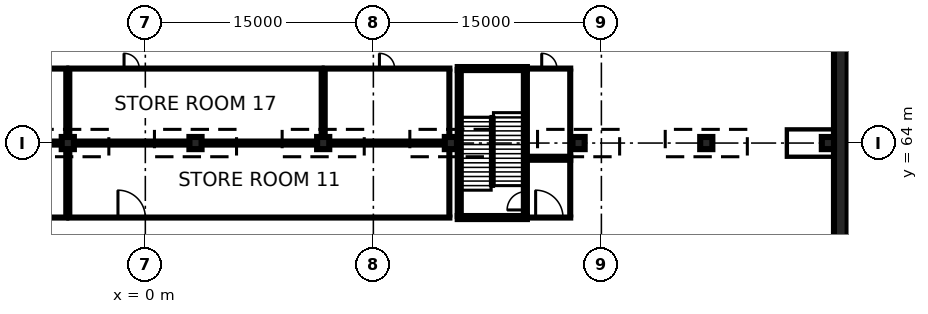
"""IFC4 building model, lengths in metres.
Left out: names, types, materials, properties, quantities, classifications, styles, units other than length and angle.
Written with IfcOpenShell. Run it as: python <this file> out.ifc"""

import sys

from ifc_helpers import new_model, si_unit, direction, frame, frame_2d, origin, origin_2d, place, context, subcontext, project, spatial, rectangle, extrude, element, fill, save


model = new_model("IFC4")
c1 = context("Model", 3, precision=1e-05, world=origin(), true_north=direction((0.0, 1.0)))
c2 = subcontext(c1, "Body", "Model", "MODEL_VIEW")
j1 = project(units=[si_unit("LENGTHUNIT", "METRE"), si_unit("PLANEANGLEUNIT", "RADIAN")], contexts=[c1])
p1 = place(None, origin())
s1 = spatial("IfcSite", under=j1, at=p1, CompositionType="ELEMENT")
p2 = place(p1, origin())
s2 = spatial("IfcBuilding", under=s1, at=p2, CompositionType="ELEMENT")
p3 = place(p2, frame((0.0, 0.0, -12.0)))
s3 = spatial("IfcBuildingStorey", under=s2, at=p3, CompositionType="ELEMENT", Elevation=-12.0)
p4 = place(p3, frame((45.75, -80.0, 0.0), z_axis=(0.0, 0.0, 1.0), x_axis=(0.0, 1.0, 0.0)))
e1 = element("IfcWall", 1, at=p4, inside=s3, PredefinedType="USERDEFINED", context=c2, shape_type="SweptSolid", body=[
    extrude(rectangle(XDim=160.0, YDim=0.9, at=frame_2d((80.0, 0.0))), origin(), (0.0, 0.0, 1.0), 11.55),
])
for number, where, z_axis, x_axis in (
    (2, (-5.1, 64.0, 0.0), (0.0, 0.0, 1.0), (1.0, 0.0, 0.0)),
    (3, (3.3, 64.0, 0.0), (0.0, 0.0, 1.0), (1.0, 0.0, 0.0)),
    (4, (11.7, 64.0, 0.0), (0.0, 0.0, 1.0), (1.0, 0.0, 0.0)),
    (5, (20.1, 64.0, 0.0), (0.0, 0.0, 1.0), (1.0, 0.0, 0.0)),
    (6, (28.5, 64.0, 0.0), (0.0, 0.0, 1.0), (1.0, 0.0, 0.0)),
    (7, (36.9, 64.0, 0.0), (0.0, 0.0, 1.0), (1.0, 0.0, 0.0)),
    (8, (44.9, 64.0, 0.0), (0.0, 0.0, 1.0), (1.0, 0.0, 0.0)),
):
    element("IfcColumn", number, at=place(p3, frame(where, z_axis=z_axis, x_axis=x_axis)), inside=s3, PredefinedType="COLUMN", context=c2, shape_type="SweptSolid", body=[
        extrude(rectangle(XDim=0.8, YDim=0.8, at=origin_2d()), origin(), (0.0, 0.0, 1.0), 4.4),
    ])
p5 = place(p3, frame((-13.5, 59.1, 0.0), z_axis=(0.0, 0.0, 1.0), x_axis=(1.0, 0.0, 0.0)))
e9 = element("IfcWall", 9, at=p5, inside=s3, PredefinedType="PARTITIONING", context=c2, shape_type="SweptSolid", body=[
    extrude(rectangle(XDim=8.4, YDim=0.2, at=frame_2d((4.2, 0.0))), origin(), (0.0, 0.0, 1.0), 4.4),
])
p6 = place(p5, frame((3.7, 0.0, 0.0)))
e10 = element("IfcOpeningElement", 10, at=p6, cuts=e9, PredefinedType="OPENING", context=c2, shape_type="SweptSolid", body=[
    extrude(rectangle(XDim=1.0, YDim=2.1, at=frame_2d((0.5, 1.05))), frame((0.0, 0.11, 0.0), z_axis=(0.0, -1.0, 0.0), x_axis=(1.0, 0.0, 0.0)), (0.0, 0.0, 1.0), 0.22),
])
p7 = place(p3, frame((-13.5, 63.9, 0.0), z_axis=(0.0, 0.0, 1.0), x_axis=(1.0, 0.0, 0.0)))
e11 = element("IfcWall", 11, at=p7, inside=s3, PredefinedType="PARTITIONING", context=c2, shape_type="SweptSolid", body=[
    extrude(rectangle(XDim=8.4, YDim=0.2, at=frame_2d((4.2, 0.0))), origin(), (0.0, 0.0, 1.0), 4.4),
])
p8 = place(p3, frame((-5.2, 59.2, 0.0), z_axis=(0.0, 0.0, 1.0), x_axis=(0.0, 1.0, 0.0)))
e12 = element("IfcWall", 12, at=p8, inside=s3, PredefinedType="PARTITIONING", context=c2, shape_type="SweptSolid", body=[
    extrude(rectangle(XDim=4.4, YDim=0.2, at=frame_2d((2.2, 0.0))), origin(), (0.0, 0.0, 1.0), 4.4),
])
p9 = place(p3, frame((-5.1, 59.1, 0.0), z_axis=(0.0, 0.0, 1.0), x_axis=(1.0, 0.0, 0.0)))
e13 = element("IfcWall", 13, at=p9, inside=s3, PredefinedType="PARTITIONING", context=c2, shape_type="SweptSolid", body=[
    extrude(rectangle(XDim=25.2, YDim=0.2, at=frame_2d((12.6, 0.0))), origin(), (0.0, 0.0, 1.0), 4.4),
])
p10 = place(p9, frame((3.3, 0.0, 0.0)))
e14 = element("IfcOpeningElement", 14, at=p10, cuts=e13, PredefinedType="OPENING", context=c2, shape_type="SweptSolid", body=[
    extrude(rectangle(XDim=1.8, YDim=2.1, at=frame_2d((0.9, 1.05))), frame((0.0, 0.11, 0.0), z_axis=(0.0, -1.0, 0.0), x_axis=(1.0, 0.0, 0.0)), (0.0, 0.0, 1.0), 0.22),
])
p11 = place(p3, frame((-5.1, 63.9, 0.0), z_axis=(0.0, 0.0, 1.0), x_axis=(1.0, 0.0, 0.0)))
e15 = element("IfcWall", 15, at=p11, inside=s3, PredefinedType="PARTITIONING", context=c2, shape_type="SweptSolid", body=[
    extrude(rectangle(XDim=25.2, YDim=0.2, at=frame_2d((12.6, 0.0))), origin(), (0.0, 0.0, 1.0), 4.4),
])
for number, where, z_axis, x_axis in (
    (16, (-5.0, 59.2, 0.0), (0.0, 0.0, 1.0), (0.0, 1.0, 0.0)),
    (17, (20.0, 59.2, 0.0), (0.0, 0.0, 1.0), (0.0, 1.0, 0.0)),
):
    element("IfcWall", number, at=place(p3, frame(where, z_axis=z_axis, x_axis=x_axis)), inside=s3, PredefinedType="PARTITIONING", context=c2, shape_type="SweptSolid", body=[
        extrude(rectangle(XDim=4.4, YDim=0.2, at=frame_2d((2.2, 0.0))), origin(), (0.0, 0.0, 1.0), 4.4),
    ])
p12 = place(p3, frame((-13.5, 64.1, 0.0), z_axis=(0.0, 0.0, 1.0), x_axis=(1.0, 0.0, 0.0)))
e18 = element("IfcWall", 18, at=p12, inside=s3, PredefinedType="PARTITIONING", context=c2, shape_type="SweptSolid", body=[
    extrude(rectangle(XDim=8.4, YDim=0.2, at=frame_2d((4.2, 0.0))), origin(), (0.0, 0.0, 1.0), 4.4),
])
p13 = place(p3, frame((-13.5, 68.9, 0.0), z_axis=(0.0, 0.0, 1.0), x_axis=(1.0, 0.0, 0.0)))
e19 = element("IfcWall", 19, at=p13, inside=s3, PredefinedType="PARTITIONING", context=c2, shape_type="SweptSolid", body=[
    extrude(rectangle(XDim=8.4, YDim=0.2, at=frame_2d((4.2, 0.0))), origin(), (0.0, 0.0, 1.0), 4.4),
])
p14 = place(p13, frame((3.7, 0.0, 0.0)))
e20 = element("IfcOpeningElement", 20, at=p14, cuts=e19, PredefinedType="OPENING", context=c2, shape_type="SweptSolid", body=[
    extrude(rectangle(XDim=1.0, YDim=2.1, at=frame_2d((0.5, 1.05))), frame((0.0, 0.11, 0.0), z_axis=(0.0, -1.0, 0.0), x_axis=(1.0, 0.0, 0.0)), (0.0, 0.0, 1.0), 0.22),
])
p15 = place(p3, frame((-5.2, 64.4, 0.0), z_axis=(0.0, 0.0, 1.0), x_axis=(0.0, 1.0, 0.0)))
e21 = element("IfcWall", 21, at=p15, inside=s3, PredefinedType="PARTITIONING", context=c2, shape_type="SweptSolid", body=[
    extrude(rectangle(XDim=4.4, YDim=0.2, at=frame_2d((2.2, 0.0))), origin(), (0.0, 0.0, 1.0), 4.4),
])
p16 = place(p3, frame((-5.1, 64.1, 0.0), z_axis=(0.0, 0.0, 1.0), x_axis=(1.0, 0.0, 0.0)))
e22 = element("IfcWall", 22, at=p16, inside=s3, PredefinedType="PARTITIONING", context=c2, shape_type="SweptSolid", body=[
    extrude(rectangle(XDim=16.8, YDim=0.2, at=frame_2d((8.4, 0.0))), origin(), (0.0, 0.0, 1.0), 4.4),
])
p17 = place(p3, frame((-5.1, 68.9, 0.0), z_axis=(0.0, 0.0, 1.0), x_axis=(1.0, 0.0, 0.0)))
e23 = element("IfcWall", 23, at=p17, inside=s3, PredefinedType="PARTITIONING", context=c2, shape_type="SweptSolid", body=[
    extrude(rectangle(XDim=16.8, YDim=0.2, at=frame_2d((8.4, 0.0))), origin(), (0.0, 0.0, 1.0), 4.4),
])
p18 = place(p17, frame((3.7, 0.0, 0.0)))
e24 = element("IfcOpeningElement", 24, at=p18, cuts=e23, PredefinedType="OPENING", context=c2, shape_type="SweptSolid", body=[
    extrude(rectangle(XDim=1.0, YDim=2.1, at=frame_2d((0.5, 1.05))), frame((0.0, 0.11, 0.0), z_axis=(0.0, -1.0, 0.0), x_axis=(1.0, 0.0, 0.0)), (0.0, 0.0, 1.0), 0.22),
])
for number, where, z_axis, x_axis in (
    (25, (-5.0, 64.4, 0.0), (0.0, 0.0, 1.0), (0.0, 1.0, 0.0)),
    (26, (11.6, 64.4, 0.0), (0.0, 0.0, 1.0), (0.0, 1.0, 0.0)),
):
    element("IfcWall", number, at=place(p3, frame(where, z_axis=z_axis, x_axis=x_axis)), inside=s3, PredefinedType="PARTITIONING", context=c2, shape_type="SweptSolid", body=[
        extrude(rectangle(XDim=4.4, YDim=0.2, at=frame_2d((2.2, 0.0))), origin(), (0.0, 0.0, 1.0), 4.4),
    ])
p19 = place(p3, frame((11.7, 64.1, 0.0), z_axis=(0.0, 0.0, 1.0), x_axis=(1.0, 0.0, 0.0)))
e27 = element("IfcWall", 27, at=p19, inside=s3, PredefinedType="PARTITIONING", context=c2, shape_type="SweptSolid", body=[
    extrude(rectangle(XDim=8.4, YDim=0.2, at=frame_2d((4.2, 0.0))), origin(), (0.0, 0.0, 1.0), 4.4),
])
p20 = place(p3, frame((11.7, 68.9, 0.0), z_axis=(0.0, 0.0, 1.0), x_axis=(1.0, 0.0, 0.0)))
e28 = element("IfcWall", 28, at=p20, inside=s3, PredefinedType="PARTITIONING", context=c2, shape_type="SweptSolid", body=[
    extrude(rectangle(XDim=8.4, YDim=0.2, at=frame_2d((4.2, 0.0))), origin(), (0.0, 0.0, 1.0), 4.4),
])
p21 = place(p20, frame((3.7, 0.0, 0.0)))
e29 = element("IfcOpeningElement", 29, at=p21, cuts=e28, PredefinedType="OPENING", context=c2, shape_type="SweptSolid", body=[
    extrude(rectangle(XDim=1.0, YDim=2.1, at=frame_2d((0.5, 1.05))), frame((0.0, 0.11, 0.0), z_axis=(0.0, -1.0, 0.0), x_axis=(1.0, 0.0, 0.0)), (0.0, 0.0, 1.0), 0.22),
])
for number, where, z_axis, x_axis in (
    (30, (11.8, 64.4, 0.0), (0.0, 0.0, 1.0), (0.0, 1.0, 0.0)),
    (31, (20.0, 64.4, 0.0), (0.0, 0.0, 1.0), (0.0, 1.0, 0.0)),
):
    element("IfcWall", number, at=place(p3, frame(where, z_axis=z_axis, x_axis=x_axis)), inside=s3, PredefinedType="PARTITIONING", context=c2, shape_type="SweptSolid", body=[
        extrude(rectangle(XDim=4.4, YDim=0.2, at=frame_2d((2.2, 0.0))), origin(), (0.0, 0.0, 1.0), 4.4),
    ])
p22 = place(p3, frame((25.1, 59.1, 0.0), z_axis=(0.0, 0.0, 1.0), x_axis=(1.0, 0.0, 0.0)))
e32 = element("IfcWall", 32, at=p22, inside=s3, PredefinedType="PARTITIONING", context=c2, shape_type="SweptSolid", body=[
    extrude(rectangle(XDim=2.95, YDim=0.2, at=frame_2d((1.475, 0.0))), origin(), (0.0, 0.0, 1.0), 4.4),
])
p23 = place(p22, frame((0.575, 0.0, 0.0)))
e33 = element("IfcOpeningElement", 33, at=p23, cuts=e32, PredefinedType="OPENING", context=c2, shape_type="SweptSolid", body=[
    extrude(rectangle(XDim=1.8, YDim=2.1, at=frame_2d((0.9, 1.05))), frame((0.0, 0.11, 0.0), z_axis=(0.0, -1.0, 0.0), x_axis=(1.0, 0.0, 0.0)), (0.0, 0.0, 1.0), 0.22),
])
p24 = place(p3, frame((25.1, 62.9, 0.0), z_axis=(0.0, 0.0, 1.0), x_axis=(1.0, 0.0, 0.0)))
e34 = element("IfcWall", 34, at=p24, inside=s3, PredefinedType="PARTITIONING", context=c2, shape_type="SweptSolid", body=[
    extrude(rectangle(XDim=2.95, YDim=0.2, at=frame_2d((1.475, 0.0))), origin(), (0.0, 0.0, 1.0), 4.4),
])
p25 = place(p3, frame((27.95, 59.2, 0.0), z_axis=(0.0, 0.0, 1.0), x_axis=(0.0, 1.0, 0.0)))
e35 = element("IfcWall", 35, at=p25, inside=s3, PredefinedType="PARTITIONING", context=c2, shape_type="SweptSolid", body=[
    extrude(rectangle(XDim=3.6, YDim=0.2, at=frame_2d((1.8, 0.0))), origin(), (0.0, 0.0, 1.0), 4.4),
])
p26 = place(p3, frame((25.1, 63.1, 0.0), z_axis=(0.0, 0.0, 1.0), x_axis=(1.0, 0.0, 0.0)))
e36 = element("IfcWall", 36, at=p26, inside=s3, PredefinedType="PARTITIONING", context=c2, shape_type="SweptSolid", body=[
    extrude(rectangle(XDim=2.95, YDim=0.2, at=frame_2d((1.475, 0.0))), origin(), (0.0, 0.0, 1.0), 4.4),
])
p27 = place(p3, frame((25.1, 68.9, 0.0), z_axis=(0.0, 0.0, 1.0), x_axis=(1.0, 0.0, 0.0)))
e37 = element("IfcWall", 37, at=p27, inside=s3, PredefinedType="PARTITIONING", context=c2, shape_type="SweptSolid", body=[
    extrude(rectangle(XDim=2.95, YDim=0.2, at=frame_2d((1.475, 0.0))), origin(), (0.0, 0.0, 1.0), 4.4),
])
p28 = place(p27, frame((0.975, 0.0, 0.0)))
e38 = element("IfcOpeningElement", 38, at=p28, cuts=e37, PredefinedType="OPENING", context=c2, shape_type="SweptSolid", body=[
    extrude(rectangle(XDim=1.0, YDim=2.1, at=frame_2d((0.5, 1.05))), frame((0.0, 0.11, 0.0), z_axis=(0.0, -1.0, 0.0), x_axis=(1.0, 0.0, 0.0)), (0.0, 0.0, 1.0), 0.22),
])
p29 = place(p3, frame((27.95, 63.2, 0.0), z_axis=(0.0, 0.0, 1.0), x_axis=(0.0, 1.0, 0.0)))
e39 = element("IfcWall", 39, at=p29, inside=s3, PredefinedType="PARTITIONING", context=c2, shape_type="SweptSolid", body=[
    extrude(rectangle(XDim=5.6, YDim=0.2, at=frame_2d((2.8, 0.0))), origin(), (0.0, 0.0, 1.0), 4.4),
])
p30 = place(p3, frame((20.65, 59.2, 0.0), z_axis=(0.0, 0.0, 1.0), x_axis=(0.0, 1.0, 0.0)))
e40 = element("IfcWall", 40, at=p30, inside=s3, PredefinedType="SOLIDWALL", context=c2, shape_type="SweptSolid", body=[
    extrude(rectangle(XDim=9.6, YDim=0.2, at=frame_2d((4.8, 0.0))), origin(), (0.0, 0.0, 1.0), 4.4),
])
p31 = place(p3, frame((25.0, 59.2, 0.0), z_axis=(0.0, 0.0, 1.0), x_axis=(0.0, 1.0, 0.0)))
e41 = element("IfcWall", 41, at=p31, inside=s3, PredefinedType="SOLIDWALL", context=c2, shape_type="SweptSolid", body=[
    extrude(rectangle(XDim=9.6, YDim=0.2, at=frame_2d((4.8, 0.0))), origin(), (0.0, 0.0, 1.0), 4.4),
])
p32 = place(p31, frame((0.4, 0.0, 0.0)))
e42 = element("IfcOpeningElement", 42, at=p32, cuts=e41, PredefinedType="OPENING", context=c2, shape_type="SweptSolid", body=[
    extrude(rectangle(XDim=1.2, YDim=2.1, at=frame_2d((0.6, 1.05))), frame((0.0, 0.11, 0.0), z_axis=(0.0, -1.0, 0.0), x_axis=(1.0, 0.0, 0.0)), (0.0, 0.0, 1.0), 0.22),
])
for number, where, z_axis, x_axis in (
    (43, (25.1, 59.1, 0.0), (0.0, 0.0, 1.0), (-1.0, 0.0, 0.0)),
    (44, (20.55, 68.9, 0.0), (0.0, 0.0, 1.0), (1.0, 0.0, 0.0)),
):
    element("IfcWall", number, at=place(p3, frame(where, z_axis=z_axis, x_axis=x_axis)), inside=s3, PredefinedType="SOLIDWALL", context=c2, shape_type="SweptSolid", body=[
        extrude(rectangle(XDim=4.55, YDim=0.2, at=frame_2d((2.275, 0.0))), origin(), (0.0, 0.0, 1.0), 4.4),
    ])
p33 = place(p10, origin())
e45 = element("IfcDoor", 45, at=p33, inside=s3, OperationType="DOUBLE_DOOR_SINGLE_SWING", PredefinedType="DOOR", context=c2, shape_type="SweptSolid", body=[
    extrude(rectangle(XDim=1.8, YDim=2.1, at=frame_2d((0.9, 1.05))), frame((0.0, 0.025, 0.0), z_axis=(0.0, -1.0, 0.0), x_axis=(1.0, 0.0, 0.0)), (0.0, 0.0, 1.0), 0.05),
])
fill(e14, e45)
p34 = place(p18, origin())
e46 = element("IfcDoor", 46, at=p34, inside=s3, OperationType="SINGLE_SWING_LEFT", PredefinedType="DOOR", context=c2, shape_type="SweptSolid", body=[
    extrude(rectangle(XDim=1.0, YDim=2.1, at=frame_2d((0.5, 1.05))), frame((0.0, 0.025, 0.0), z_axis=(0.0, -1.0, 0.0), x_axis=(1.0, 0.0, 0.0)), (0.0, 0.0, 1.0), 0.05),
])
fill(e24, e46)
p35 = place(p21, origin())
e47 = element("IfcDoor", 47, at=p35, inside=s3, OperationType="SINGLE_SWING_LEFT", PredefinedType="DOOR", context=c2, shape_type="SweptSolid", body=[
    extrude(rectangle(XDim=1.0, YDim=2.1, at=frame_2d((0.5, 1.05))), frame((0.0, 0.025, 0.0), z_axis=(0.0, -1.0, 0.0), x_axis=(1.0, 0.0, 0.0)), (0.0, 0.0, 1.0), 0.05),
])
fill(e29, e47)
p36 = place(p23, origin())
e48 = element("IfcDoor", 48, at=p36, inside=s3, OperationType="DOUBLE_DOOR_SINGLE_SWING", PredefinedType="DOOR", context=c2, shape_type="SweptSolid", body=[
    extrude(rectangle(XDim=1.8, YDim=2.1, at=frame_2d((0.9, 1.05))), frame((0.0, 0.025, 0.0), z_axis=(0.0, -1.0, 0.0), x_axis=(1.0, 0.0, 0.0)), (0.0, 0.0, 1.0), 0.05),
])
fill(e33, e48)
p37 = place(p28, origin())
e49 = element("IfcDoor", 49, at=p37, inside=s3, OperationType="SINGLE_SWING_LEFT", PredefinedType="DOOR", context=c2, shape_type="SweptSolid", body=[
    extrude(rectangle(XDim=1.0, YDim=2.1, at=frame_2d((0.5, 1.05))), frame((0.0, 0.025, 0.0), z_axis=(0.0, -1.0, 0.0), x_axis=(1.0, 0.0, 0.0)), (0.0, 0.0, 1.0), 0.05),
])
fill(e38, e49)
p38 = place(p32, origin())
e50 = element("IfcDoor", 50, at=p38, inside=s3, OperationType="SINGLE_SWING_LEFT", PredefinedType="DOOR", context=c2, shape_type="SweptSolid", body=[
    extrude(rectangle(XDim=1.2, YDim=2.1, at=frame_2d((0.6, 1.05))), frame((0.0, 0.025, 0.0), z_axis=(0.0, -1.0, 0.0), x_axis=(1.0, 0.0, 0.0)), (0.0, 0.0, 1.0), 0.05),
])
fill(e42, e50)
save(model, sys.argv[1])
